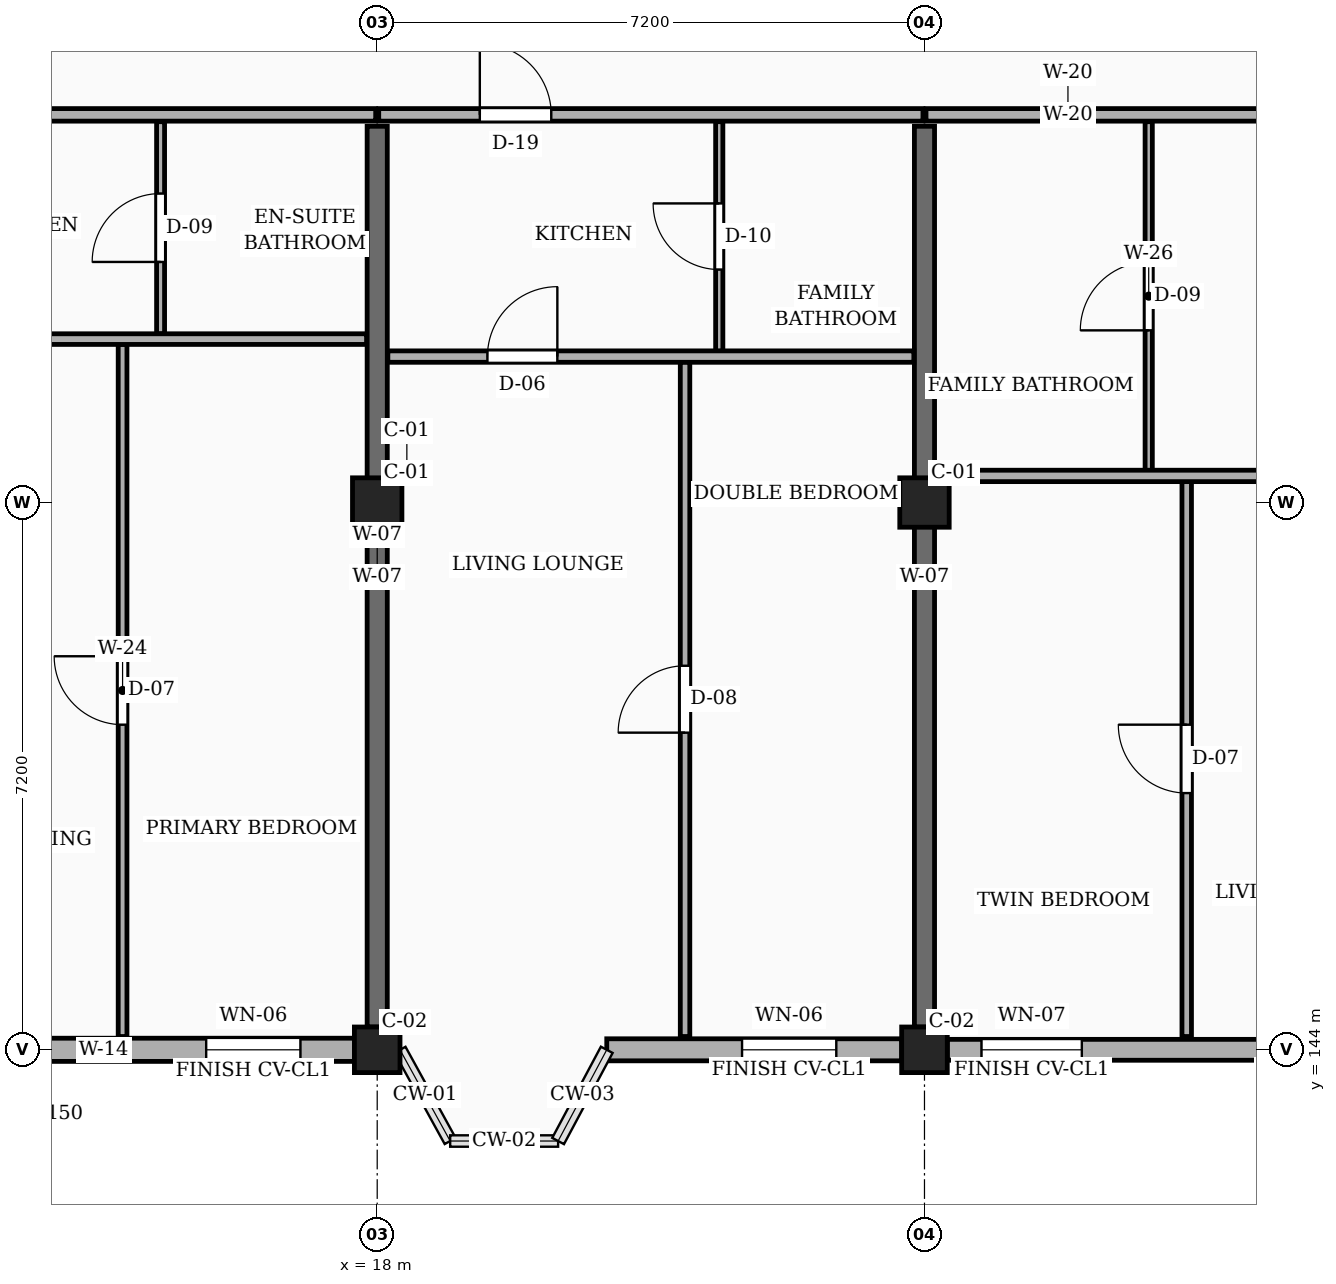
"""IFC4 building model, lengths in metres.
Left out: names, types, materials, properties, quantities, classifications, styles, units other than length and angle.
Written with IfcOpenShell. Run it as: python <this file> out.ifc"""

import sys

from ifc_helpers import new_model, si_unit, direction, frame, frame_2d, origin, origin_2d, place, context, subcontext, project, spatial, rectangle, extrude, element, fill, save


model = new_model("IFC4")
c1 = context("Model", 3, precision=1e-05, world=origin(), true_north=direction((0.0, 1.0)))
c2 = subcontext(c1, "Body", "Model", "MODEL_VIEW")
j1 = project(units=[si_unit("LENGTHUNIT", "METRE"), si_unit("PLANEANGLEUNIT", "RADIAN")], contexts=[c1])
p1 = place(None, origin())
s1 = spatial("IfcSite", under=j1, at=p1, CompositionType="ELEMENT")
p2 = place(p1, origin())
s2 = spatial("IfcBuilding", under=s1, at=p2, CompositionType="ELEMENT")
p3 = place(p2, frame((0.0, 0.0, 7.65)))
s3 = spatial("IfcBuildingStorey", under=s2, at=p3, CompositionType="ELEMENT", Elevation=7.65)
p4 = place(p3, frame((18.0, 144.0, 0.0), z_axis=(0.0, 0.0, 1.0), x_axis=(1.0, 0.0, 0.0)))
e1 = element("IfcColumn", 1, at=p4, inside=s3, PredefinedType="COLUMN", context=c2, shape_type="SweptSolid", body=[
    extrude(rectangle(XDim=0.6, YDim=0.6, at=origin_2d()), origin(), (0.0, 0.0, 1.0), 3.15),
])
p5 = place(p3, frame((18.0, 151.2, 0.0), z_axis=(0.0, 0.0, 1.0), x_axis=(1.0, 0.0, 0.0)))
e2 = element("IfcColumn", 2, at=p5, inside=s3, PredefinedType="COLUMN", context=c2, shape_type="SweptSolid", body=[
    extrude(rectangle(XDim=0.65, YDim=0.65, at=origin_2d()), origin(), (0.0, 0.0, 1.0), 3.15),
])
p6 = place(p3, frame((25.2, 144.0, 0.0), z_axis=(0.0, 0.0, 1.0), x_axis=(1.0, 0.0, 0.0)))
e3 = element("IfcColumn", 3, at=p6, inside=s3, PredefinedType="COLUMN", context=c2, shape_type="SweptSolid", body=[
    extrude(rectangle(XDim=0.6, YDim=0.6, at=origin_2d()), origin(), (0.0, 0.0, 1.0), 3.15),
])
p7 = place(p3, frame((25.2, 151.2, 0.0), z_axis=(0.0, 0.0, 1.0), x_axis=(1.0, 0.0, 0.0)))
e4 = element("IfcColumn", 4, at=p7, inside=s3, PredefinedType="COLUMN", context=c2, shape_type="SweptSolid", body=[
    extrude(rectangle(XDim=0.65, YDim=0.65, at=origin_2d()), origin(), (0.0, 0.0, 1.0), 3.15),
])
for number, where, z_axis, x_axis in (
    (5, (18.0, 144.3, 0.0), (0.0, 0.0, 1.0), (0.0, 1.0, 0.0)),
    (6, (25.2, 144.3, 0.0), (0.0, 0.0, 1.0), (0.0, 1.0, 0.0)),
):
    element("IfcWall", number, at=place(p3, frame(where, z_axis=z_axis, x_axis=x_axis)), inside=s3, PredefinedType="SOLIDWALL", context=c2, shape_type="SweptSolid", body=[
        extrude(rectangle(XDim=11.85, YDim=0.265, at=frame_2d((5.925, 0.0))), origin(), (0.0, 0.0, 1.0), 2.185),
    ])
p8 = place(p3, frame((11.1, 144.0, 0.0), z_axis=(0.0, 0.0, 1.0), x_axis=(1.0, 0.0, 0.0)))
e7 = element("IfcWall", 7, at=p8, inside=s3, PredefinedType="SOLIDWALL", context=c2, shape_type="SweptSolid", body=[
    extrude(rectangle(XDim=6.6, YDim=0.305, at=frame_2d((3.3, 0.0))), origin(), (0.0, 0.0, 1.0), 2.455),
])
p9 = place(p8, frame((0.45, 0.0, 0.78)))
e8 = element("IfcOpeningElement", 8, at=p9, cuts=e7, PredefinedType="OPENING", context=c2, shape_type="SweptSolid", body=[
    extrude(rectangle(XDim=1.08, YDim=1.15, at=frame_2d((0.54, 0.575))), frame((0.0, 0.163, 0.0), z_axis=(0.0, -1.0, 0.0), x_axis=(1.0, 0.0, 0.0)), (0.0, 0.0, 1.0), 0.325),
])
p10 = place(p8, frame((4.65, 0.0, 0.78)))
e9 = element("IfcOpeningElement", 9, at=p10, cuts=e7, PredefinedType="OPENING", context=c2, shape_type="SweptSolid", body=[
    extrude(rectangle(XDim=1.24, YDim=1.15, at=frame_2d((0.62, 0.575))), frame((0.0, 0.163, 0.0), z_axis=(0.0, -1.0, 0.0), x_axis=(1.0, 0.0, 0.0)), (0.0, 0.0, 1.0), 0.325),
])
p11 = place(p3, frame((21.02, 144.0, 0.0), z_axis=(0.0, 0.0, 1.0), x_axis=(1.0, 0.0, 0.0)))
e10 = element("IfcWall", 10, at=p11, inside=s3, PredefinedType="SOLIDWALL", context=c2, shape_type="SweptSolid", body=[
    extrude(rectangle(XDim=3.88, YDim=0.29, at=frame_2d((1.94, 0.0))), origin(), (0.0, 0.0, 1.0), 2.455),
])
p12 = place(p11, frame((1.78, 0.0, 0.78)))
e11 = element("IfcOpeningElement", 11, at=p12, cuts=e10, PredefinedType="OPENING", context=c2, shape_type="SweptSolid", body=[
    extrude(rectangle(XDim=1.24, YDim=1.15, at=frame_2d((0.62, 0.575))), frame((0.0, 0.155, 0.0), z_axis=(0.0, -1.0, 0.0), x_axis=(1.0, 0.0, 0.0)), (0.0, 0.0, 1.0), 0.31),
])
p13 = place(p3, frame((25.5, 144.0, 0.0), z_axis=(0.0, 0.0, 1.0), x_axis=(1.0, 0.0, 0.0)))
e12 = element("IfcWall", 12, at=p13, inside=s3, PredefinedType="SOLIDWALL", context=c2, shape_type="SweptSolid", body=[
    extrude(rectangle(XDim=6.6, YDim=0.275, at=frame_2d((3.3, 0.0))), origin(), (0.0, 0.0, 1.0), 2.455),
])
p14 = place(p13, frame((0.45, 0.0, 0.78)))
e13 = element("IfcOpeningElement", 13, at=p14, cuts=e12, PredefinedType="OPENING", context=c2, shape_type="SweptSolid", body=[
    extrude(rectangle(XDim=1.32, YDim=1.15, at=frame_2d((0.66, 0.575))), frame((0.0, 0.147, 0.0), z_axis=(0.0, -1.0, 0.0), x_axis=(1.0, 0.0, 0.0)), (0.0, 0.0, 1.0), 0.295),
])
p15 = place(p13, frame((4.65, 0.0, 0.78)))
e14 = element("IfcOpeningElement", 14, at=p15, cuts=e12, PredefinedType="OPENING", context=c2, shape_type="SweptSolid", body=[
    extrude(rectangle(XDim=0.88, YDim=1.26, at=frame_2d((0.44, 0.63))), frame((0.0, 0.147, 0.0), z_axis=(0.0, -1.0, 0.0), x_axis=(1.0, 0.0, 0.0)), (0.0, 0.0, 1.0), 0.295),
])
p16 = place(p3, frame((10.975, 156.3, 0.0), z_axis=(0.0, 0.0, 1.0), x_axis=(1.0, 0.0, 0.0)))
e15 = element("IfcWall", 15, at=p16, inside=s3, PredefinedType="PARTITIONING", context=c2, shape_type="SweptSolid", body=[
    extrude(rectangle(XDim=7.005, YDim=0.165, at=frame_2d((3.502, 0.0))), origin(), (0.0, 0.0, 1.0), 2.32),
])
p17 = place(p16, frame((1.175, 0.0, 0.0)))
e16 = element("IfcOpeningElement", 16, at=p17, cuts=e15, PredefinedType="OPENING", context=c2, shape_type="SweptSolid", body=[
    extrude(rectangle(XDim=1.0, YDim=2.15, at=frame_2d((0.5, 1.075))), frame((0.0, 0.093, 0.0), z_axis=(0.0, -1.0, 0.0), x_axis=(1.0, 0.0, 0.0)), (0.0, 0.0, 1.0), 0.185),
])
p18 = place(p3, frame((18.02, 156.3, 0.0), z_axis=(0.0, 0.0, 1.0), x_axis=(1.0, 0.0, 0.0)))
e17 = element("IfcWall", 17, at=p18, inside=s3, PredefinedType="PARTITIONING", context=c2, shape_type="SweptSolid", body=[
    extrude(rectangle(XDim=7.16, YDim=0.165, at=frame_2d((3.58, 0.0))), origin(), (0.0, 0.0, 1.0), 2.32),
])
p19 = place(p18, frame((1.33, 0.0, 0.0)))
e18 = element("IfcOpeningElement", 18, at=p19, cuts=e17, PredefinedType="OPENING", context=c2, shape_type="SweptSolid", body=[
    extrude(rectangle(XDim=0.94, YDim=2.12, at=frame_2d((0.47, 1.06))), frame((0.0, 0.093, 0.0), z_axis=(0.0, -1.0, 0.0), x_axis=(1.0, 0.0, 0.0)), (0.0, 0.0, 1.0), 0.185),
])
p20 = place(p3, frame((25.22, 156.3, 0.0), z_axis=(0.0, 0.0, 1.0), x_axis=(1.0, 0.0, 0.0)))
e19 = element("IfcWall", 19, at=p20, inside=s3, PredefinedType="PARTITIONING", context=c2, shape_type="SweptSolid", body=[
    extrude(rectangle(XDim=7.16, YDim=0.165, at=frame_2d((3.58, 0.0))), origin(), (0.0, 0.0, 1.0), 2.32),
])
p21 = place(p20, frame((4.78, 0.0, 0.0)))
e20 = element("IfcOpeningElement", 20, at=p21, cuts=e19, PredefinedType="OPENING", context=c2, shape_type="SweptSolid", body=[
    extrude(rectangle(XDim=1.14, YDim=2.18, at=frame_2d((0.57, 1.09))), frame((0.0, 0.093, 0.0), z_axis=(0.0, -1.0, 0.0), x_axis=(1.0, 0.0, 0.0)), (0.0, 0.0, 1.0), 0.185),
])
p22 = place(p3, frame((14.65, 144.175, 0.0), z_axis=(0.0, 0.0, 1.0), x_axis=(0.0, 1.0, 0.0)))
e21 = element("IfcWall", 21, at=p22, inside=s3, PredefinedType="PARTITIONING", context=c2, shape_type="SweptSolid", body=[
    extrude(rectangle(XDim=9.105, YDim=0.115, at=frame_2d((4.552, 0.0))), origin(), (0.0, 0.0, 1.0), 2.32),
])
p23 = place(p22, frame((4.103, 0.0, 0.0)))
e22 = element("IfcOpeningElement", 22, at=p23, cuts=e21, PredefinedType="OPENING", context=c2, shape_type="SweptSolid", body=[
    extrude(rectangle(XDim=0.9, YDim=2.1, at=frame_2d((0.45, 1.05))), frame((0.0, 0.067, 0.0), z_axis=(0.0, -1.0, 0.0), x_axis=(1.0, 0.0, 0.0)), (0.0, 0.0, 1.0), 0.135),
])
p24 = place(p3, frame((15.15, 153.42, 0.0), z_axis=(0.0, 0.0, 1.0), x_axis=(0.0, 1.0, 0.0)))
e23 = element("IfcWall", 23, at=p24, inside=s3, PredefinedType="PARTITIONING", context=c2, shape_type="SweptSolid", body=[
    extrude(rectangle(XDim=2.79, YDim=0.105, at=frame_2d((1.395, 0.0))), origin(), (0.0, 0.0, 1.0), 2.32),
])
p25 = place(p24, frame((0.945, 0.0, 0.0)))
e24 = element("IfcOpeningElement", 24, at=p25, cuts=e23, PredefinedType="OPENING", context=c2, shape_type="SweptSolid", body=[
    extrude(rectangle(XDim=0.9, YDim=2.05, at=frame_2d((0.45, 1.025))), frame((0.0, 0.062, 0.0), z_axis=(0.0, -1.0, 0.0), x_axis=(1.0, 0.0, 0.0)), (0.0, 0.0, 1.0), 0.125),
])
p26 = place(p3, frame((10.975, 153.35, 0.0), z_axis=(0.0, 0.0, 1.0), x_axis=(1.0, 0.0, 0.0)))
e25 = element("IfcWall", 25, at=p26, inside=s3, PredefinedType="PARTITIONING", context=c2, shape_type="SweptSolid", body=[
    extrude(rectangle(XDim=6.885, YDim=0.14, at=frame_2d((3.442, 0.0))), origin(), (0.0, 0.0, 1.0), 2.32),
])
p27 = place(p26, frame((1.275, 0.0, 0.0)))
e26 = element("IfcOpeningElement", 26, at=p27, cuts=e25, PredefinedType="OPENING", context=c2, shape_type="SweptSolid", body=[
    extrude(rectangle(XDim=0.95, YDim=2.1, at=frame_2d((0.475, 1.05))), frame((0.0, 0.08, 0.0), z_axis=(0.0, -1.0, 0.0), x_axis=(1.0, 0.0, 0.0)), (0.0, 0.0, 1.0), 0.16),
])
p28 = place(p3, frame((22.05, 144.175, 0.0), z_axis=(0.0, 0.0, 1.0), x_axis=(0.0, 1.0, 0.0)))
e27 = element("IfcWall", 27, at=p28, inside=s3, PredefinedType="PARTITIONING", context=c2, shape_type="SweptSolid", body=[
    extrude(rectangle(XDim=8.875, YDim=0.125, at=frame_2d((4.438, 0.0))), origin(), (0.0, 0.0, 1.0), 2.32),
])
p29 = place(p28, frame((3.998, 0.0, 0.0)))
e28 = element("IfcOpeningElement", 28, at=p29, cuts=e27, PredefinedType="OPENING", context=c2, shape_type="SweptSolid", body=[
    extrude(rectangle(XDim=0.88, YDim=2.08, at=frame_2d((0.44, 1.04))), frame((0.0, 0.073, 0.0), z_axis=(0.0, -1.0, 0.0), x_axis=(1.0, 0.0, 0.0)), (0.0, 0.0, 1.0), 0.145),
])
p30 = place(p3, frame((22.5, 153.19, 0.0), z_axis=(0.0, 0.0, 1.0), x_axis=(0.0, 1.0, 0.0)))
e29 = element("IfcWall", 29, at=p30, inside=s3, PredefinedType="PARTITIONING", context=c2, shape_type="SweptSolid", body=[
    extrude(rectangle(XDim=3.02, YDim=0.095, at=frame_2d((1.51, 0.0))), origin(), (0.0, 0.0, 1.0), 2.32),
])
p31 = place(p30, frame((1.075, 0.0, 0.0)))
e30 = element("IfcOpeningElement", 30, at=p31, cuts=e29, PredefinedType="OPENING", context=c2, shape_type="SweptSolid", body=[
    extrude(rectangle(XDim=0.87, YDim=2.05, at=frame_2d((0.435, 1.025))), frame((0.0, 0.058, 0.0), z_axis=(0.0, -1.0, 0.0), x_axis=(1.0, 0.0, 0.0)), (0.0, 0.0, 1.0), 0.115),
])
p32 = place(p3, frame((18.14, 153.12, 0.0), z_axis=(0.0, 0.0, 1.0), x_axis=(1.0, 0.0, 0.0)))
e31 = element("IfcWall", 31, at=p32, inside=s3, PredefinedType="PARTITIONING", context=c2, shape_type="SweptSolid", body=[
    extrude(rectangle(XDim=6.92, YDim=0.15, at=frame_2d((3.46, 0.0))), origin(), (0.0, 0.0, 1.0), 2.32),
])
p33 = place(p32, frame((1.31, 0.0, 0.0)))
e32 = element("IfcOpeningElement", 32, at=p33, cuts=e31, PredefinedType="OPENING", context=c2, shape_type="SweptSolid", body=[
    extrude(rectangle(XDim=0.92, YDim=2.1, at=frame_2d((0.46, 1.05))), frame((0.0, 0.085, 0.0), z_axis=(0.0, -1.0, 0.0), x_axis=(1.0, 0.0, 0.0)), (0.0, 0.0, 1.0), 0.17),
])
p34 = place(p3, frame((28.65, 144.175, 0.0), z_axis=(0.0, 0.0, 1.0), x_axis=(0.0, 1.0, 0.0)))
e33 = element("IfcWall", 33, at=p34, inside=s3, PredefinedType="PARTITIONING", context=c2, shape_type="SweptSolid", body=[
    extrude(rectangle(XDim=7.305, YDim=0.125, at=frame_2d((3.652, 0.0))), origin(), (0.0, 0.0, 1.0), 2.32),
])
p35 = place(p34, frame((3.202, 0.0, 0.0)))
e34 = element("IfcOpeningElement", 34, at=p35, cuts=e33, PredefinedType="OPENING", context=c2, shape_type="SweptSolid", body=[
    extrude(rectangle(XDim=0.9, YDim=2.1, at=frame_2d((0.45, 1.05))), frame((0.0, 0.073, 0.0), z_axis=(0.0, -1.0, 0.0), x_axis=(1.0, 0.0, 0.0)), (0.0, 0.0, 1.0), 0.145),
])
p36 = place(p3, frame((28.15, 151.62, 0.0), z_axis=(0.0, 0.0, 1.0), x_axis=(0.0, 1.0, 0.0)))
e35 = element("IfcWall", 35, at=p36, inside=s3, PredefinedType="PARTITIONING", context=c2, shape_type="SweptSolid", body=[
    extrude(rectangle(XDim=4.59, YDim=0.095, at=frame_2d((2.295, 0.0))), origin(), (0.0, 0.0, 1.0), 2.32),
])
p37 = place(p36, frame((1.845, 0.0, 0.0)))
e36 = element("IfcOpeningElement", 36, at=p37, cuts=e35, PredefinedType="OPENING", context=c2, shape_type="SweptSolid", body=[
    extrude(rectangle(XDim=0.9, YDim=2.05, at=frame_2d((0.45, 1.025))), frame((0.0, 0.058, 0.0), z_axis=(0.0, -1.0, 0.0), x_axis=(1.0, 0.0, 0.0)), (0.0, 0.0, 1.0), 0.115),
])
p38 = place(p3, frame((25.34, 151.55, 0.0), z_axis=(0.0, 0.0, 1.0), x_axis=(1.0, 0.0, 0.0)))
e37 = element("IfcWall", 37, at=p38, inside=s3, PredefinedType="PARTITIONING", context=c2, shape_type="SweptSolid", body=[
    extrude(rectangle(XDim=6.92, YDim=0.15, at=frame_2d((3.46, 0.0))), origin(), (0.0, 0.0, 1.0), 2.32),
])
p39 = place(p38, frame((4.66, 0.0, 0.0)))
e38 = element("IfcOpeningElement", 38, at=p39, cuts=e37, PredefinedType="OPENING", context=c2, shape_type="SweptSolid", body=[
    extrude(rectangle(XDim=0.95, YDim=2.1, at=frame_2d((0.475, 1.05))), frame((0.0, 0.085, 0.0), z_axis=(0.0, -1.0, 0.0), x_axis=(1.0, 0.0, 0.0)), (0.0, 0.0, 1.0), 0.17),
])
p40 = place(p10, origin())
e39 = element("IfcWindow", 39, at=p40, inside=s3, PartitioningType="SINGLE_PANEL", PredefinedType="WINDOW", context=c2, shape_type="SweptSolid", body=[
    extrude(rectangle(XDim=1.24, YDim=1.15, at=frame_2d((0.62, 0.575))), frame((0.0, 0.03, 0.0), z_axis=(0.0, -1.0, 0.0), x_axis=(1.0, 0.0, 0.0)), (0.0, 0.0, 1.0), 0.06),
])
fill(e9, e39)
p41 = place(p12, origin())
e40 = element("IfcWindow", 40, at=p41, inside=s3, PartitioningType="SINGLE_PANEL", PredefinedType="WINDOW", context=c2, shape_type="SweptSolid", body=[
    extrude(rectangle(XDim=1.24, YDim=1.15, at=frame_2d((0.62, 0.575))), frame((0.0, 0.03, 0.0), z_axis=(0.0, -1.0, 0.0), x_axis=(1.0, 0.0, 0.0)), (0.0, 0.0, 1.0), 0.06),
])
fill(e11, e40)
p42 = place(p14, origin())
e41 = element("IfcWindow", 41, at=p42, inside=s3, PartitioningType="SINGLE_PANEL", PredefinedType="WINDOW", context=c2, shape_type="SweptSolid", body=[
    extrude(rectangle(XDim=1.32, YDim=1.15, at=frame_2d((0.66, 0.575))), frame((0.0, 0.03, 0.0), z_axis=(0.0, -1.0, 0.0), x_axis=(1.0, 0.0, 0.0)), (0.0, 0.0, 1.0), 0.06),
])
fill(e13, e41)
p43 = place(p19, origin())
e42 = element("IfcDoor", 42, at=p43, inside=s3, OperationType="SINGLE_SWING_LEFT", PredefinedType="DOOR", context=c2, shape_type="SweptSolid", body=[
    extrude(rectangle(XDim=0.94, YDim=2.12, at=frame_2d((0.47, 1.06))), frame((0.0, 0.025, 0.0), z_axis=(0.0, -1.0, 0.0), x_axis=(1.0, 0.0, 0.0)), (0.0, 0.0, 1.0), 0.05),
])
fill(e18, e42)
p44 = place(p23, origin())
e43 = element("IfcDoor", 43, at=p44, inside=s3, OperationType="SINGLE_SWING_RIGHT", PredefinedType="DOOR", context=c2, shape_type="SweptSolid", body=[
    extrude(rectangle(XDim=0.9, YDim=2.1, at=frame_2d((0.45, 1.05))), frame((0.0, 0.025, 0.0), z_axis=(0.0, -1.0, 0.0), x_axis=(1.0, 0.0, 0.0)), (0.0, 0.0, 1.0), 0.05),
])
fill(e22, e43)
p45 = place(p25, origin())
e44 = element("IfcDoor", 44, at=p45, inside=s3, OperationType="SINGLE_SWING_LEFT", PredefinedType="DOOR", context=c2, shape_type="SweptSolid", body=[
    extrude(rectangle(XDim=0.9, YDim=2.05, at=frame_2d((0.45, 1.025))), frame((0.0, 0.025, 0.0), z_axis=(0.0, -1.0, 0.0), x_axis=(1.0, 0.0, 0.0)), (0.0, 0.0, 1.0), 0.05),
])
fill(e24, e44)
p46 = place(p29, origin())
e45 = element("IfcDoor", 45, at=p46, inside=s3, OperationType="SINGLE_SWING_LEFT", PredefinedType="DOOR", context=c2, shape_type="SweptSolid", body=[
    extrude(rectangle(XDim=0.88, YDim=2.08, at=frame_2d((0.44, 1.04))), frame((0.0, 0.025, 0.0), z_axis=(0.0, -1.0, 0.0), x_axis=(1.0, 0.0, 0.0)), (0.0, 0.0, 1.0), 0.05),
])
fill(e28, e45)
p47 = place(p31, origin())
e46 = element("IfcDoor", 46, at=p47, inside=s3, OperationType="SINGLE_SWING_RIGHT", PredefinedType="DOOR", context=c2, shape_type="SweptSolid", body=[
    extrude(rectangle(XDim=0.87, YDim=2.05, at=frame_2d((0.435, 1.025))), frame((0.0, 0.025, 0.0), z_axis=(0.0, -1.0, 0.0), x_axis=(1.0, 0.0, 0.0)), (0.0, 0.0, 1.0), 0.05),
])
fill(e30, e46)
p48 = place(p33, origin())
e47 = element("IfcDoor", 47, at=p48, inside=s3, OperationType="SINGLE_SWING_RIGHT", PredefinedType="DOOR", context=c2, shape_type="SweptSolid", body=[
    extrude(rectangle(XDim=0.92, YDim=2.1, at=frame_2d((0.46, 1.05))), frame((0.0, 0.025, 0.0), z_axis=(0.0, -1.0, 0.0), x_axis=(1.0, 0.0, 0.0)), (0.0, 0.0, 1.0), 0.05),
])
fill(e32, e47)
p49 = place(p35, origin())
e48 = element("IfcDoor", 48, at=p49, inside=s3, OperationType="SINGLE_SWING_RIGHT", PredefinedType="DOOR", context=c2, shape_type="SweptSolid", body=[
    extrude(rectangle(XDim=0.9, YDim=2.1, at=frame_2d((0.45, 1.05))), frame((0.0, 0.025, 0.0), z_axis=(0.0, -1.0, 0.0), x_axis=(1.0, 0.0, 0.0)), (0.0, 0.0, 1.0), 0.05),
])
fill(e34, e48)
p50 = place(p37, origin())
e49 = element("IfcDoor", 49, at=p50, inside=s3, OperationType="SINGLE_SWING_LEFT", PredefinedType="DOOR", context=c2, shape_type="SweptSolid", body=[
    extrude(rectangle(XDim=0.9, YDim=2.05, at=frame_2d((0.45, 1.025))), frame((0.0, 0.025, 0.0), z_axis=(0.0, -1.0, 0.0), x_axis=(1.0, 0.0, 0.0)), (0.0, 0.0, 1.0), 0.05),
])
fill(e36, e49)
save(model, sys.argv[1])
